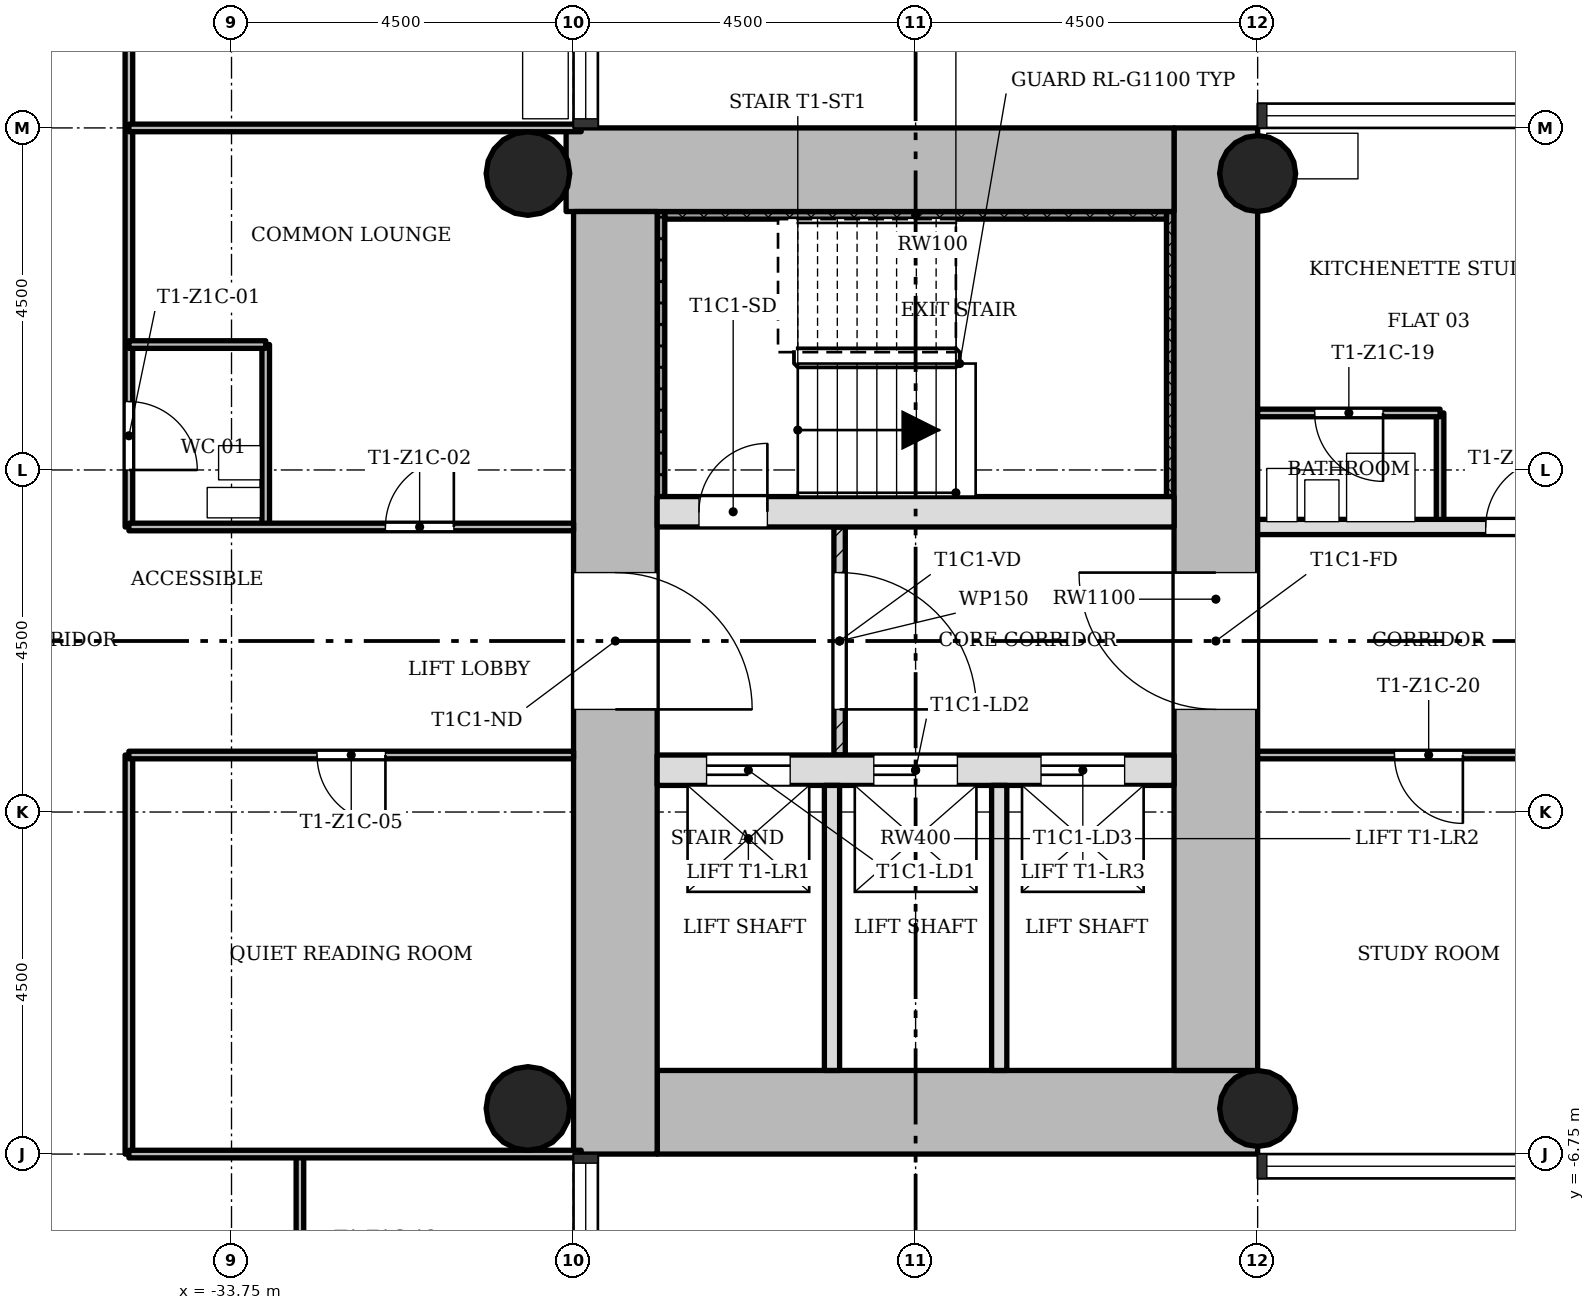
"""IFC4 building model, lengths in metres.
Left out: names, types, materials, properties, quantities, classifications, styles, units other than length and angle.
Written with IfcOpenShell. Run it as: python <this file> out.ifc"""

import sys

from ifc_helpers import new_model, si_unit, direction, frame, frame_2d, origin, origin_2d, place, context, subcontext, project, spatial, rectangle, hollow_circle, extrude, element, fill, save


model = new_model("IFC4")
c1 = context("Model", 3, precision=1e-05, world=origin(), true_north=direction((0.0, 1.0)))
c2 = subcontext(c1, "Body", "Model", "MODEL_VIEW")
j1 = project(units=[si_unit("LENGTHUNIT", "METRE"), si_unit("PLANEANGLEUNIT", "RADIAN")], contexts=[c1])
p1 = place(None, origin())
s1 = spatial("IfcSite", under=j1, at=p1, CompositionType="ELEMENT")
p2 = place(p1, origin())
s2 = spatial("IfcBuilding", under=s1, at=p2, CompositionType="ELEMENT")
p3 = place(p2, frame((0.0, 0.0, 48.3)))
s3 = spatial("IfcBuildingStorey", under=s2, at=p3, CompositionType="ELEMENT", Elevation=48.3)
p4 = place(p3, frame((-28.15, -6.2, 0.0), z_axis=(0.0, 0.0, 1.0), x_axis=(1.0, 0.0, 0.0)))
e1 = element("IfcWall", 1, at=p4, inside=s3, PredefinedType="SHEAR", context=c2, shape_type="SweptSolid", body=[
    extrude(rectangle(XDim=7.9, YDim=1.1, at=frame_2d((3.95, 0.0))), origin(), (0.0, 0.0, 1.0), 3.4),
])
p5 = place(p3, frame((-20.8, -5.65, 0.0), z_axis=(0.0, 0.0, 1.0), x_axis=(0.0, 1.0, 0.0)))
e2 = element("IfcWall", 2, at=p5, inside=s3, PredefinedType="SHEAR", context=c2, shape_type="SweptSolid", body=[
    extrude(rectangle(XDim=12.4, YDim=1.1, at=frame_2d((6.2, 0.0))), origin(), (0.0, 0.0, 1.0), 3.4),
])
p6 = place(p5, frame((4.75, 0.0, 0.0)))
e3 = element("IfcOpeningElement", 3, at=p6, cuts=e2, PredefinedType="OPENING", context=c2, shape_type="SweptSolid", body=[
    extrude(rectangle(XDim=1.8, YDim=2.1, at=frame_2d((0.9, 1.05))), frame((0.0, 0.56, 0.0), z_axis=(0.0, -1.0, 0.0), x_axis=(1.0, 0.0, 0.0)), (0.0, 0.0, 1.0), 1.12),
])
p7 = place(p3, frame((-21.35, 6.2, 0.0), z_axis=(0.0, 0.0, 1.0), x_axis=(-1.0, 0.0, 0.0)))
e4 = element("IfcWall", 4, at=p7, inside=s3, PredefinedType="SHEAR", context=c2, shape_type="SweptSolid", body=[
    extrude(rectangle(XDim=7.998, YDim=1.1, at=frame_2d((3.999, 0.0))), origin(), (0.0, 0.0, 1.0), 3.4),
])
p8 = place(p3, frame((-28.7, 5.65, 0.0), z_axis=(0.0, 0.0, 1.0), x_axis=(0.0, -1.0, 0.0)))
e5 = element("IfcWall", 5, at=p8, inside=s3, PredefinedType="SHEAR", context=c2, shape_type="SweptSolid", body=[
    extrude(rectangle(XDim=12.4, YDim=1.1, at=frame_2d((6.2, 0.0))), origin(), (0.0, 0.0, 1.0), 3.4),
])
p9 = place(p8, frame((4.75, 0.0, 0.0)))
e6 = element("IfcOpeningElement", 6, at=p9, cuts=e5, PredefinedType="OPENING", context=c2, shape_type="SweptSolid", body=[
    extrude(rectangle(XDim=1.8, YDim=2.1, at=frame_2d((0.9, 1.05))), frame((0.0, 0.56, 0.0), z_axis=(0.0, -1.0, 0.0), x_axis=(1.0, 0.0, 0.0)), (0.0, 0.0, 1.0), 1.12),
])
p10 = place(p3, frame((-28.15, -1.7, 0.0), z_axis=(0.0, 0.0, 1.0), x_axis=(1.0, 0.0, 0.0)))
e7 = element("IfcWall", 7, at=p10, inside=s3, PredefinedType="SHEAR", context=c2, shape_type="SweptSolid", body=[
    extrude(rectangle(XDim=6.8, YDim=0.4, at=frame_2d((3.4, 0.0))), origin(), (0.0, 0.0, 1.0), 3.4),
])
p11 = place(p10, frame((0.65, 0.0, 0.0)))
e8 = element("IfcOpeningElement", 8, at=p11, cuts=e7, PredefinedType="OPENING", context=c2, shape_type="SweptSolid", body=[
    extrude(rectangle(XDim=1.1, YDim=2.1, at=frame_2d((0.55, 1.05))), frame((0.0, 0.21, 0.0), z_axis=(0.0, -1.0, 0.0), x_axis=(1.0, 0.0, 0.0)), (0.0, 0.0, 1.0), 0.42),
])
p12 = place(p10, frame((2.85, 0.0, 0.0)))
e9 = element("IfcOpeningElement", 9, at=p12, cuts=e7, PredefinedType="OPENING", context=c2, shape_type="SweptSolid", body=[
    extrude(rectangle(XDim=1.1, YDim=2.1, at=frame_2d((0.55, 1.05))), frame((0.0, 0.21, 0.0), z_axis=(0.0, -1.0, 0.0), x_axis=(1.0, 0.0, 0.0)), (0.0, 0.0, 1.0), 0.42),
])
p13 = place(p10, frame((5.05, 0.0, 0.0)))
e10 = element("IfcOpeningElement", 10, at=p13, cuts=e7, PredefinedType="OPENING", context=c2, shape_type="SweptSolid", body=[
    extrude(rectangle(XDim=1.1, YDim=2.1, at=frame_2d((0.55, 1.05))), frame((0.0, 0.21, 0.0), z_axis=(0.0, -1.0, 0.0), x_axis=(1.0, 0.0, 0.0)), (0.0, 0.0, 1.0), 0.42),
])
p14 = place(p3, frame((-28.15, 1.7, 0.0), z_axis=(0.0, 0.0, 1.0), x_axis=(1.0, 0.0, 0.0)))
e11 = element("IfcWall", 11, at=p14, inside=s3, PredefinedType="SHEAR", context=c2, shape_type="SweptSolid", body=[
    extrude(rectangle(XDim=6.8, YDim=0.4, at=frame_2d((3.4, 0.0))), origin(), (0.0, 0.0, 1.0), 3.4),
])
p15 = place(p14, frame((0.55, 0.0, 0.0)))
e12 = element("IfcOpeningElement", 12, at=p15, cuts=e11, PredefinedType="OPENING", context=c2, shape_type="SweptSolid", body=[
    extrude(rectangle(XDim=0.9, YDim=2.1, at=frame_2d((0.45, 1.05))), frame((0.0, 0.21, 0.0), z_axis=(0.0, -1.0, 0.0), x_axis=(1.0, 0.0, 0.0)), (0.0, 0.0, 1.0), 0.42),
])
for number, where, z_axis, x_axis in (
    (13, (-20.25, -6.15, 0.0), (0.0, 0.0, 1.0), (1.0, 0.0, 0.0)),
    (14, (-20.25, 6.15, 0.0), (0.0, 0.0, 1.0), (1.0, 0.0, 0.0)),
):
    element("IfcColumn", number, at=place(p3, frame(where, z_axis=z_axis, x_axis=x_axis)), inside=s3, PredefinedType="COLUMN", context=c2, shape_type="SweptSolid", body=[
        extrude(hollow_circle(Radius=0.5, WallThickness=0.036, at=origin_2d()), origin(), (0.0, 0.0, 1.0), 3.4),
    ])
for number, where, z_axis, x_axis in (
    (15, (-29.85, -6.15, 0.0), (0.0, 0.0, 1.0), (1.0, 0.0, 0.0)),
    (16, (-29.85, 6.15, 0.0), (0.0, 0.0, 1.0), (1.0, 0.0, 0.0)),
):
    element("IfcColumn", number, at=place(p3, frame(where, z_axis=z_axis, x_axis=x_axis)), inside=s3, PredefinedType="COLUMN", context=c2, shape_type="SweptSolid", body=[
        extrude(hollow_circle(Radius=0.55, WallThickness=0.04, at=origin_2d()), origin(), (0.0, 0.0, 1.0), 3.4),
    ])
p16 = place(p3, frame((-25.75, -1.5, 0.0), z_axis=(0.0, 0.0, 1.0), x_axis=(0.0, 1.0, 0.0)))
e17 = element("IfcWall", 17, at=p16, inside=s3, PredefinedType="PARTITIONING", context=c2, shape_type="SweptSolid", body=[
    extrude(rectangle(XDim=3.0, YDim=0.15, at=frame_2d((1.5, 0.0))), origin(), (0.0, 0.0, 1.0), 3.0),
])
p17 = place(p16, frame((0.6, 0.0, 0.0)))
e18 = element("IfcOpeningElement", 18, at=p17, cuts=e17, PredefinedType="OPENING", context=c2, shape_type="SweptSolid", body=[
    extrude(rectangle(XDim=1.8, YDim=2.1, at=frame_2d((0.9, 1.05))), frame((0.0, 0.085, 0.0), z_axis=(0.0, -1.0, 0.0), x_axis=(1.0, 0.0, 0.0)), (0.0, 0.0, 1.0), 0.17),
])
for number, where, z_axis, x_axis in (
    (19, (-25.85, -5.65, 0.0), (0.0, 0.0, 1.0), (0.0, 1.0, 0.0)),
    (20, (-23.65, -5.65, 0.0), (0.0, 0.0, 1.0), (0.0, 1.0, 0.0)),
):
    element("IfcWall", number, at=place(p3, frame(where, z_axis=z_axis, x_axis=x_axis)), inside=s3, PredefinedType="SOLIDWALL", context=c2, shape_type="SweptSolid", body=[
        extrude(rectangle(XDim=3.75, YDim=0.2, at=frame_2d((1.875, 0.0))), origin(), (0.0, 0.0, 1.0), 3.0),
    ])
p18 = place(p3, frame((-35.1, -6.75, 0.0), z_axis=(0.0, 0.0, 1.0), x_axis=(0.0, 1.0, 0.0)))
e21 = element("IfcWall", 21, at=p18, inside=s3, PredefinedType="PARTITIONING", context=c2, shape_type="SweptSolid", body=[
    extrude(rectangle(XDim=5.25, YDim=0.1, at=frame_2d((2.625, 0.0))), origin(), (0.0, 0.0, 1.0), 3.0),
])
p19 = place(p3, frame((-35.1, 1.5, 0.0), z_axis=(0.0, 0.0, 1.0), x_axis=(0.0, 1.0, 0.0)))
e22 = element("IfcWall", 22, at=p19, inside=s3, PredefinedType="PARTITIONING", context=c2, shape_type="SweptSolid", body=[
    extrude(rectangle(XDim=7.05, YDim=0.1, at=frame_2d((3.525, 0.0))), origin(), (0.0, 0.0, 1.0), 3.0),
])
p20 = place(p19, frame((0.75, 0.0, 0.0)))
e23 = element("IfcOpeningElement", 23, at=p20, cuts=e22, PredefinedType="OPENING", context=c2, shape_type="SweptSolid", body=[
    extrude(rectangle(XDim=0.9, YDim=2.1, at=frame_2d((0.45, 1.05))), frame((0.0, 0.06, 0.0), z_axis=(0.0, -1.0, 0.0), x_axis=(1.0, 0.0, 0.0)), (0.0, 0.0, 1.0), 0.12),
])
p21 = place(p3, frame((-33.3, 1.5, 0.0), z_axis=(0.0, 0.0, 1.0), x_axis=(0.0, 1.0, 0.0)))
e24 = element("IfcWall", 24, at=p21, inside=s3, PredefinedType="PARTITIONING", context=c2, shape_type="SweptSolid", body=[
    extrude(rectangle(XDim=2.4, YDim=0.1, at=frame_2d((1.2, 0.0))), origin(), (0.0, 0.0, 1.0), 3.0),
])
p22 = place(p3, frame((-32.85, -15.75, 0.0), z_axis=(0.0, 0.0, 1.0), x_axis=(0.0, 1.0, 0.0)))
e25 = element("IfcWall", 25, at=p22, inside=s3, PredefinedType="PARTITIONING", context=c2, shape_type="SweptSolid", body=[
    extrude(rectangle(XDim=9.0, YDim=0.1, at=frame_2d((4.5, 0.0))), origin(), (0.0, 0.0, 1.0), 3.0),
])
p23 = place(p22, frame((6.3, 0.0, 0.0)))
e26 = element("IfcOpeningElement", 26, at=p23, cuts=e25, PredefinedType="OPENING", context=c2, shape_type="SweptSolid", body=[
    extrude(rectangle(XDim=0.9, YDim=2.1, at=frame_2d((0.45, 1.05))), frame((0.0, 0.06, 0.0), z_axis=(0.0, -1.0, 0.0), x_axis=(1.0, 0.0, 0.0)), (0.0, 0.0, 1.0), 0.12),
])
p24 = place(p22, frame((1.8, 0.0, 0.0)))
e27 = element("IfcOpeningElement", 27, at=p24, cuts=e25, PredefinedType="OPENING", context=c2, shape_type="SweptSolid", body=[
    extrude(rectangle(XDim=0.9, YDim=2.1, at=frame_2d((0.45, 1.05))), frame((0.0, 0.06, 0.0), z_axis=(0.0, -1.0, 0.0), x_axis=(1.0, 0.0, 0.0)), (0.0, 0.0, 1.0), 0.12),
])
p25 = place(p3, frame((-17.85, 1.5, 0.0), z_axis=(0.0, 0.0, 1.0), x_axis=(0.0, 1.0, 0.0)))
e28 = element("IfcWall", 28, at=p25, inside=s3, PredefinedType="PARTITIONING", context=c2, shape_type="SweptSolid", body=[
    extrude(rectangle(XDim=1.5, YDim=0.1, at=frame_2d((0.75, 0.0))), origin(), (0.0, 0.0, 1.0), 3.0),
])
p26 = place(p3, frame((-35.1, -6.75, 0.0), z_axis=(0.0, 0.0, 1.0), x_axis=(1.0, 0.0, 0.0)))
e29 = element("IfcWall", 29, at=p26, inside=s3, PredefinedType="PARTITIONING", context=c2, shape_type="SweptSolid", body=[
    extrude(rectangle(XDim=5.95, YDim=0.1, at=frame_2d((2.975, 0.0))), origin(), (0.0, 0.0, 1.0), 3.0),
])
p27 = place(p3, frame((-35.1, -1.5, 0.0), z_axis=(0.0, 0.0, 1.0), x_axis=(1.0, 0.0, 0.0)))
e30 = element("IfcWall", 30, at=p27, inside=s3, PredefinedType="PARTITIONING", context=c2, shape_type="SweptSolid", body=[
    extrude(rectangle(XDim=5.85, YDim=0.1, at=frame_2d((2.925, 0.0))), origin(), (0.0, 0.0, 1.0), 3.0),
])
p28 = place(p27, frame((2.475, 0.0, 0.0)))
e31 = element("IfcOpeningElement", 31, at=p28, cuts=e30, PredefinedType="OPENING", context=c2, shape_type="SweptSolid", body=[
    extrude(rectangle(XDim=0.9, YDim=2.1, at=frame_2d((0.45, 1.05))), frame((0.0, 0.06, 0.0), z_axis=(0.0, -1.0, 0.0), x_axis=(1.0, 0.0, 0.0)), (0.0, 0.0, 1.0), 0.12),
])
p29 = place(p3, frame((-20.25, -1.5, 0.0), z_axis=(0.0, 0.0, 1.0), x_axis=(1.0, 0.0, 0.0)))
e32 = element("IfcWall", 32, at=p29, inside=s3, PredefinedType="PARTITIONING", context=c2, shape_type="SweptSolid", body=[
    extrude(rectangle(XDim=4.5, YDim=0.1, at=frame_2d((2.25, 0.0))), origin(), (0.0, 0.0, 1.0), 3.0),
])
p30 = place(p29, frame((1.8, 0.0, 0.0)))
e33 = element("IfcOpeningElement", 33, at=p30, cuts=e32, PredefinedType="OPENING", context=c2, shape_type="SweptSolid", body=[
    extrude(rectangle(XDim=0.9, YDim=2.1, at=frame_2d((0.45, 1.05))), frame((0.0, 0.06, 0.0), z_axis=(0.0, -1.0, 0.0), x_axis=(1.0, 0.0, 0.0)), (0.0, 0.0, 1.0), 0.12),
])
p31 = place(p3, frame((-35.1, 1.5, 0.0), z_axis=(0.0, 0.0, 1.0), x_axis=(1.0, 0.0, 0.0)))
e34 = element("IfcWall", 34, at=p31, inside=s3, PredefinedType="PARTITIONING", context=c2, shape_type="SweptSolid", body=[
    extrude(rectangle(XDim=5.85, YDim=0.1, at=frame_2d((2.925, 0.0))), origin(), (0.0, 0.0, 1.0), 3.0),
])
p32 = place(p31, frame((3.375, 0.0, 0.0)))
e35 = element("IfcOpeningElement", 35, at=p32, cuts=e34, PredefinedType="OPENING", context=c2, shape_type="SweptSolid", body=[
    extrude(rectangle(XDim=0.9, YDim=2.1, at=frame_2d((0.45, 1.05))), frame((0.0, 0.06, 0.0), z_axis=(0.0, -1.0, 0.0), x_axis=(1.0, 0.0, 0.0)), (0.0, 0.0, 1.0), 0.12),
])
p33 = place(p3, frame((-20.25, 1.5, 0.0), z_axis=(0.0, 0.0, 1.0), x_axis=(1.0, 0.0, 0.0)))
e36 = element("IfcWall", 36, at=p33, inside=s3, PredefinedType="SOLIDWALL", context=c2, shape_type="SweptSolid", body=[
    extrude(rectangle(XDim=4.5, YDim=0.2, at=frame_2d((2.25, 0.0))), origin(), (0.0, 0.0, 1.0), 3.0),
])
p34 = place(p33, frame((3.0, 0.0, 0.0)))
e37 = element("IfcOpeningElement", 37, at=p34, cuts=e36, PredefinedType="OPENING", context=c2, shape_type="SweptSolid", body=[
    extrude(rectangle(XDim=0.9, YDim=2.1, at=frame_2d((0.45, 1.05))), frame((0.0, 0.11, 0.0), z_axis=(0.0, -1.0, 0.0), x_axis=(1.0, 0.0, 0.0)), (0.0, 0.0, 1.0), 0.22),
])
p35 = place(p3, frame((-20.25, 3.0, 0.0), z_axis=(0.0, 0.0, 1.0), x_axis=(1.0, 0.0, 0.0)))
e38 = element("IfcWall", 38, at=p35, inside=s3, PredefinedType="PARTITIONING", context=c2, shape_type="SweptSolid", body=[
    extrude(rectangle(XDim=2.4, YDim=0.1, at=frame_2d((1.2, 0.0))), origin(), (0.0, 0.0, 1.0), 3.0),
])
p36 = place(p35, frame((0.75, 0.0, 0.0)))
e39 = element("IfcOpeningElement", 39, at=p36, cuts=e38, PredefinedType="OPENING", context=c2, shape_type="SweptSolid", body=[
    extrude(rectangle(XDim=0.9, YDim=2.1, at=frame_2d((0.45, 1.05))), frame((0.0, 0.06, 0.0), z_axis=(0.0, -1.0, 0.0), x_axis=(1.0, 0.0, 0.0)), (0.0, 0.0, 1.0), 0.12),
])
p37 = place(p3, frame((-35.1, 3.9, 0.0), z_axis=(0.0, 0.0, 1.0), x_axis=(1.0, 0.0, 0.0)))
e40 = element("IfcWall", 40, at=p37, inside=s3, PredefinedType="PARTITIONING", context=c2, shape_type="SweptSolid", body=[
    extrude(rectangle(XDim=1.8, YDim=0.1, at=frame_2d((0.9, 0.0))), origin(), (0.0, 0.0, 1.0), 3.0),
])
p38 = place(p3, frame((-35.1, 6.75, 0.0), z_axis=(0.0, 0.0, 1.0), x_axis=(1.0, 0.0, 0.0)))
e41 = element("IfcWall", 41, at=p38, inside=s3, PredefinedType="PARTITIONING", context=c2, shape_type="SweptSolid", body=[
    extrude(rectangle(XDim=5.95, YDim=0.1, at=frame_2d((2.975, 0.0))), origin(), (0.0, 0.0, 1.0), 3.0),
])
p39 = place(p3, frame((-21.4, 1.9, 0.0), z_axis=(0.0, 0.0, 1.0), x_axis=(0.0, 1.0, 0.0)))
e42 = element("IfcWall", 42, at=p39, inside=s3, PredefinedType="SHEAR", context=c2, shape_type="SweptSolid", body=[
    extrude(rectangle(XDim=3.75, YDim=0.1, at=frame_2d((1.875, 0.0))), origin(), (0.0, 0.0, 1.0), 3.4),
])
p40 = place(p3, frame((-28.05, 5.6, 0.0), z_axis=(0.0, 0.0, 1.0), x_axis=(1.0, 0.0, 0.0)))
e43 = element("IfcWall", 43, at=p40, inside=s3, PredefinedType="SHEAR", context=c2, shape_type="SweptSolid", body=[
    extrude(rectangle(XDim=6.6, YDim=0.1, at=frame_2d((3.3, 0.0))), origin(), (0.0, 0.0, 1.0), 3.4),
])
p41 = place(p3, frame((-28.1, 1.9, 0.0), z_axis=(0.0, 0.0, 1.0), x_axis=(0.0, 1.0, 0.0)))
e44 = element("IfcWall", 44, at=p41, inside=s3, PredefinedType="SHEAR", context=c2, shape_type="SweptSolid", body=[
    extrude(rectangle(XDim=3.75, YDim=0.1, at=frame_2d((1.875, 0.0))), origin(), (0.0, 0.0, 1.0), 3.4),
])
p42 = place(p17, origin())
e45 = element("IfcDoor", 45, at=p42, inside=s3, OperationType="SINGLE_SWING_LEFT", PredefinedType="DOOR", context=c2, shape_type="SweptSolid", body=[
    extrude(rectangle(XDim=1.8, YDim=2.1, at=frame_2d((0.9, 1.05))), frame((0.0, 0.025, 0.0), z_axis=(0.0, -1.0, 0.0), x_axis=(1.0, 0.0, 0.0)), (0.0, 0.0, 1.0), 0.05),
])
fill(e18, e45)
p43 = place(p20, origin())
e46 = element("IfcDoor", 46, at=p43, inside=s3, OperationType="SINGLE_SWING_LEFT", PredefinedType="DOOR", context=c2, shape_type="SweptSolid", body=[
    extrude(rectangle(XDim=0.9, YDim=2.1, at=frame_2d((0.45, 1.05))), frame((0.0, 0.025, 0.0), z_axis=(0.0, -1.0, 0.0), x_axis=(1.0, 0.0, 0.0)), (0.0, 0.0, 1.0), 0.05),
])
fill(e23, e46)
p44 = place(p32, origin())
e47 = element("IfcDoor", 47, at=p44, inside=s3, OperationType="SINGLE_SWING_LEFT", PredefinedType="DOOR", context=c2, shape_type="SweptSolid", body=[
    extrude(rectangle(XDim=0.9, YDim=2.1, at=frame_2d((0.45, 1.05))), frame((0.0, 0.025, 0.0), z_axis=(0.0, -1.0, 0.0), x_axis=(1.0, 0.0, 0.0)), (0.0, 0.0, 1.0), 0.05),
])
fill(e35, e47)
p45 = place(p28, origin())
e48 = element("IfcDoor", 48, at=p45, inside=s3, OperationType="SINGLE_SWING_RIGHT", PredefinedType="DOOR", context=c2, shape_type="SweptSolid", body=[
    extrude(rectangle(XDim=0.9, YDim=2.1, at=frame_2d((0.45, 1.05))), frame((0.0, 0.025, 0.0), z_axis=(0.0, -1.0, 0.0), x_axis=(1.0, 0.0, 0.0)), (0.0, 0.0, 1.0), 0.05),
])
fill(e31, e48)
p46 = place(p34, origin())
e49 = element("IfcDoor", 49, at=p46, inside=s3, OperationType="SINGLE_SWING_LEFT", PredefinedType="DOOR", context=c2, shape_type="SweptSolid", body=[
    extrude(rectangle(XDim=0.9, YDim=2.1, at=frame_2d((0.45, 1.05))), frame((0.0, 0.025, 0.0), z_axis=(0.0, -1.0, 0.0), x_axis=(1.0, 0.0, 0.0)), (0.0, 0.0, 1.0), 0.05),
])
fill(e37, e49)
p47 = place(p36, origin())
e50 = element("IfcDoor", 50, at=p47, inside=s3, OperationType="SINGLE_SWING_RIGHT", PredefinedType="DOOR", context=c2, shape_type="SweptSolid", body=[
    extrude(rectangle(XDim=0.9, YDim=2.1, at=frame_2d((0.45, 1.05))), frame((0.0, 0.025, 0.0), z_axis=(0.0, -1.0, 0.0), x_axis=(1.0, 0.0, 0.0)), (0.0, 0.0, 1.0), 0.05),
])
fill(e39, e50)
p48 = place(p30, origin())
e51 = element("IfcDoor", 51, at=p48, inside=s3, OperationType="SINGLE_SWING_RIGHT", PredefinedType="DOOR", context=c2, shape_type="SweptSolid", body=[
    extrude(rectangle(XDim=0.9, YDim=2.1, at=frame_2d((0.45, 1.05))), frame((0.0, 0.025, 0.0), z_axis=(0.0, -1.0, 0.0), x_axis=(1.0, 0.0, 0.0)), (0.0, 0.0, 1.0), 0.05),
])
fill(e33, e51)
p49 = place(p15, origin())
e52 = element("IfcDoor", 52, at=p49, inside=s3, OperationType="SINGLE_SWING_LEFT", PredefinedType="DOOR", context=c2, shape_type="SweptSolid", body=[
    extrude(rectangle(XDim=0.9, YDim=2.1, at=frame_2d((0.45, 1.05))), frame((0.0, 0.025, 0.0), z_axis=(0.0, -1.0, 0.0), x_axis=(1.0, 0.0, 0.0)), (0.0, 0.0, 1.0), 0.05),
])
fill(e12, e52)
p50 = place(p11, origin())
e53 = element("IfcDoor", 53, at=p50, inside=s3, OperationType="SLIDING_TO_LEFT", PredefinedType="DOOR", context=c2, shape_type="SweptSolid", body=[
    extrude(rectangle(XDim=1.1, YDim=2.1, at=frame_2d((0.55, 1.05))), frame((0.0, 0.025, 0.0), z_axis=(0.0, -1.0, 0.0), x_axis=(1.0, 0.0, 0.0)), (0.0, 0.0, 1.0), 0.05),
])
fill(e8, e53)
p51 = place(p12, origin())
e54 = element("IfcDoor", 54, at=p51, inside=s3, OperationType="SLIDING_TO_LEFT", PredefinedType="DOOR", context=c2, shape_type="SweptSolid", body=[
    extrude(rectangle(XDim=1.1, YDim=2.1, at=frame_2d((0.55, 1.05))), frame((0.0, 0.025, 0.0), z_axis=(0.0, -1.0, 0.0), x_axis=(1.0, 0.0, 0.0)), (0.0, 0.0, 1.0), 0.05),
])
fill(e9, e54)
p52 = place(p13, origin())
e55 = element("IfcDoor", 55, at=p52, inside=s3, OperationType="SLIDING_TO_LEFT", PredefinedType="DOOR", context=c2, shape_type="SweptSolid", body=[
    extrude(rectangle(XDim=1.1, YDim=2.1, at=frame_2d((0.55, 1.05))), frame((0.0, 0.025, 0.0), z_axis=(0.0, -1.0, 0.0), x_axis=(1.0, 0.0, 0.0)), (0.0, 0.0, 1.0), 0.05),
])
fill(e10, e55)
p53 = place(p9, origin())
e56 = element("IfcDoor", 56, at=p53, inside=s3, OperationType="SINGLE_SWING_LEFT", PredefinedType="DOOR", context=c2, shape_type="SweptSolid", body=[
    extrude(rectangle(XDim=1.8, YDim=2.1, at=frame_2d((0.9, 1.05))), frame((0.0, 0.025, 0.0), z_axis=(0.0, -1.0, 0.0), x_axis=(1.0, 0.0, 0.0)), (0.0, 0.0, 1.0), 0.05),
])
fill(e6, e56)
p54 = place(p6, origin())
e57 = element("IfcDoor", 57, at=p54, inside=s3, OperationType="SINGLE_SWING_LEFT", PredefinedType="DOOR", context=c2, shape_type="SweptSolid", body=[
    extrude(rectangle(XDim=1.8, YDim=2.1, at=frame_2d((0.9, 1.05))), frame((0.0, 0.025, 0.0), z_axis=(0.0, -1.0, 0.0), x_axis=(1.0, 0.0, 0.0)), (0.0, 0.0, 1.0), 0.05),
])
fill(e3, e57)
save(model, sys.argv[1])
